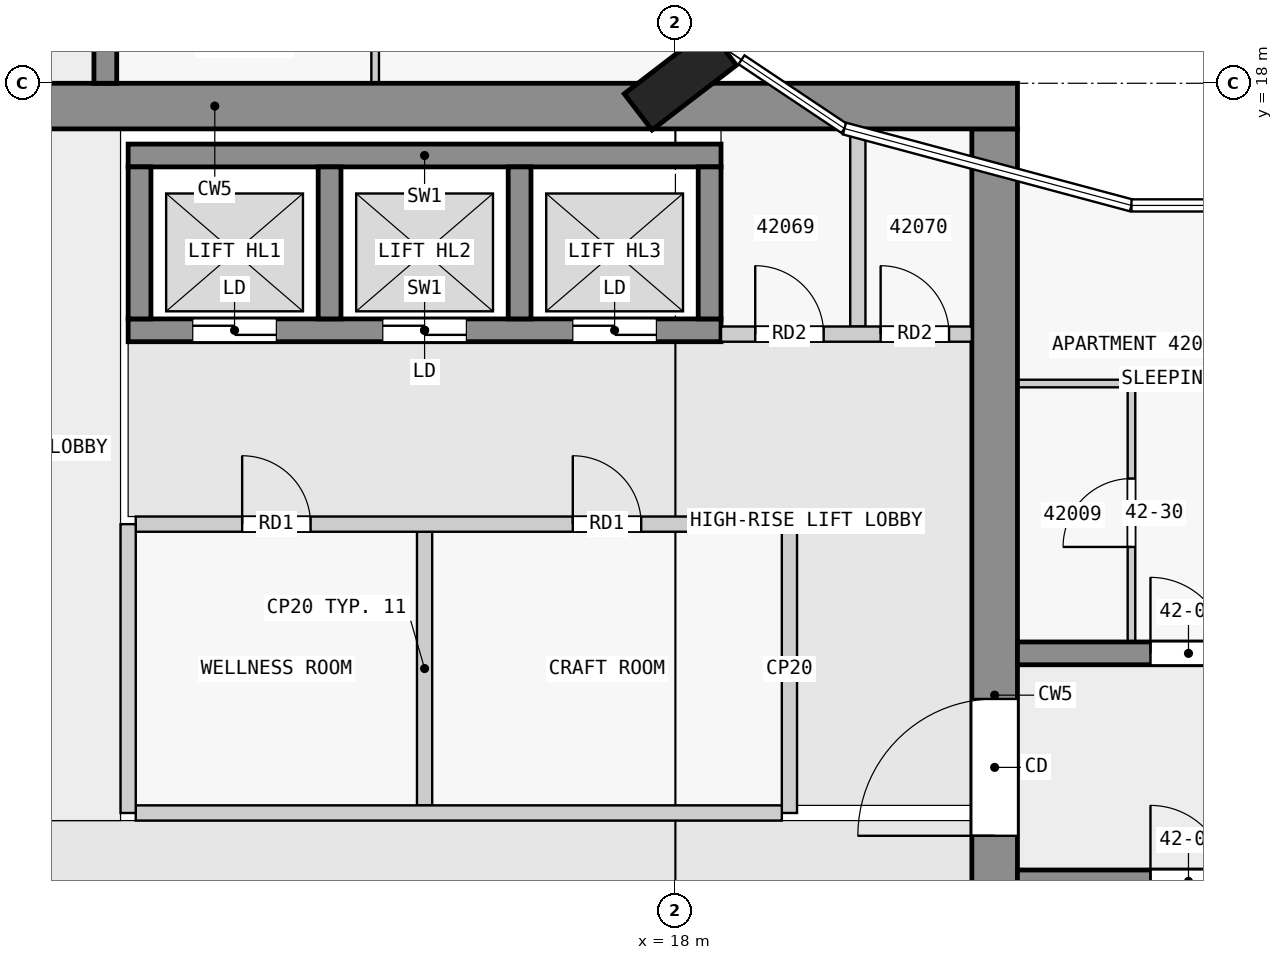
"""IFC4 building model, lengths in metres.
Left out: names, types, materials, properties, quantities, classifications, styles, units other than length and angle.
Written with IfcOpenShell. Run it as: python <this file> out.ifc"""

import sys

from ifc_helpers import new_model, si_unit, direction, frame, frame_2d, origin, origin_2d, place, context, subcontext, project, spatial, rectangle, extrude, element, fill, save


model = new_model("IFC4")
c1 = context("Model", 3, precision=1e-05, world=origin(), true_north=direction((0.0, 1.0)))
c2 = subcontext(c1, "Body", "Model", "MODEL_VIEW")
j1 = project(units=[si_unit("LENGTHUNIT", "METRE"), si_unit("PLANEANGLEUNIT", "RADIAN")], contexts=[c1])
p1 = place(None, origin())
s1 = spatial("IfcSite", under=j1, at=p1, CompositionType="ELEMENT")
p2 = place(p1, origin())
s2 = spatial("IfcBuilding", under=s1, at=p2, CompositionType="ELEMENT")
p3 = place(p2, frame((0.0, 0.0, 163.9)))
s3 = spatial("IfcBuildingStorey", under=s2, at=p3, CompositionType="ELEMENT", Elevation=163.9)
p4 = place(p3, frame((18.065, 18.05, 0.0), z_axis=(0.0, 0.0, 1.0), x_axis=(-0.608810846443, 0.793315418515, 0.0)))
e1 = element("IfcColumn", 1, at=p4, inside=s3, PredefinedType="COLUMN", context=c2, shape_type="SweptSolid", body=[
    extrude(rectangle(XDim=0.6, YDim=1.4, at=origin_2d()), origin(), (0.0, 0.0, 1.0), 3.5),
])
p5 = place(p3, frame((1.38, 17.7, 0.0), z_axis=(0.0, 0.0, 1.0), x_axis=(1.0, 0.0, 0.0)))
e2 = element("IfcWall", 2, at=p5, inside=s3, PredefinedType="SHEAR", context=c2, shape_type="SweptSolid", body=[
    extrude(rectangle(XDim=21.12, YDim=0.6, at=frame_2d((10.56, 0.0))), origin(), (0.0, 0.0, 1.0), 3.25),
])
p6 = place(p5, frame((6.4, 0.0, 0.0)))
e3 = element("IfcOpeningElement", 3, at=p6, cuts=e2, PredefinedType="OPENING", context=c2, shape_type="SweptSolid", body=[
    extrude(rectangle(XDim=1.8, YDim=2.1, at=frame_2d((0.9, 1.05))), frame((0.0, 0.31, 0.0), z_axis=(0.0, -1.0, 0.0), x_axis=(1.0, 0.0, 0.0)), (0.0, 0.0, 1.0), 0.62),
])
p7 = place(p3, frame((22.2, 2.5, 0.0), z_axis=(0.0, 0.0, 1.0), x_axis=(0.0, 1.0, 0.0)))
e4 = element("IfcWall", 4, at=p7, inside=s3, PredefinedType="SHEAR", context=c2, shape_type="SweptSolid", body=[
    extrude(rectangle(XDim=14.9, YDim=0.6, at=frame_2d((7.45, 0.0))), origin(), (0.0, 0.0, 1.0), 3.25),
])
p8 = place(p7, frame((5.6, 0.0, 0.0)))
e5 = element("IfcOpeningElement", 5, at=p8, cuts=e4, PredefinedType="OPENING", context=c2, shape_type="SweptSolid", body=[
    extrude(rectangle(XDim=1.8, YDim=2.1, at=frame_2d((0.9, 1.05))), frame((0.0, 0.31, 0.0), z_axis=(0.0, -1.0, 0.0), x_axis=(1.0, 0.0, 0.0)), (0.0, 0.0, 1.0), 0.62),
])
p9 = place(p3, frame((10.8, 17.05, 0.0), z_axis=(0.0, 0.0, 1.0), x_axis=(1.0, 0.0, 0.0)))
e6 = element("IfcWall", 6, at=p9, inside=s3, PredefinedType="SHEAR", context=c2, shape_type="SweptSolid", body=[
    extrude(rectangle(XDim=7.8, YDim=0.3, at=frame_2d((3.9, 0.0))), origin(), (0.0, 0.0, 1.0), 3.25),
])
p10 = place(p3, frame((10.8, 14.75, 0.0), z_axis=(0.0, 0.0, 1.0), x_axis=(1.0, 0.0, 0.0)))
e7 = element("IfcWall", 7, at=p10, inside=s3, PredefinedType="SHEAR", context=c2, shape_type="SweptSolid", body=[
    extrude(rectangle(XDim=7.8, YDim=0.3, at=frame_2d((3.9, 0.0))), origin(), (0.0, 0.0, 1.0), 3.25),
])
p11 = place(p10, frame((0.85, 0.0, 0.0)))
e8 = element("IfcOpeningElement", 8, at=p11, cuts=e7, PredefinedType="OPENING", context=c2, shape_type="SweptSolid", body=[
    extrude(rectangle(XDim=1.1, YDim=2.1, at=frame_2d((0.55, 1.05))), frame((0.0, 0.16, 0.0), z_axis=(0.0, -1.0, 0.0), x_axis=(1.0, 0.0, 0.0)), (0.0, 0.0, 1.0), 0.32),
])
p12 = place(p10, frame((3.35, 0.0, 0.0)))
e9 = element("IfcOpeningElement", 9, at=p12, cuts=e7, PredefinedType="OPENING", context=c2, shape_type="SweptSolid", body=[
    extrude(rectangle(XDim=1.1, YDim=2.1, at=frame_2d((0.55, 1.05))), frame((0.0, 0.16, 0.0), z_axis=(0.0, -1.0, 0.0), x_axis=(1.0, 0.0, 0.0)), (0.0, 0.0, 1.0), 0.32),
])
p13 = place(p10, frame((5.85, 0.0, 0.0)))
e10 = element("IfcOpeningElement", 10, at=p13, cuts=e7, PredefinedType="OPENING", context=c2, shape_type="SweptSolid", body=[
    extrude(rectangle(XDim=1.1, YDim=2.1, at=frame_2d((0.55, 1.05))), frame((0.0, 0.16, 0.0), z_axis=(0.0, -1.0, 0.0), x_axis=(1.0, 0.0, 0.0)), (0.0, 0.0, 1.0), 0.32),
])
for number, where, z_axis, x_axis in (
    (11, (10.95, 14.9, 0.0), (0.0, 0.0, 1.0), (0.0, 1.0, 0.0)),
    (12, (13.45, 14.9, 0.0), (0.0, 0.0, 1.0), (0.0, 1.0, 0.0)),
    (13, (15.95, 14.9, 0.0), (0.0, 0.0, 1.0), (0.0, 1.0, 0.0)),
    (14, (18.45, 14.9, 0.0), (0.0, 0.0, 1.0), (0.0, 1.0, 0.0)),
):
    element("IfcWall", number, at=place(p3, frame(where, z_axis=z_axis, x_axis=x_axis)), inside=s3, PredefinedType="SHEAR", context=c2, shape_type="SweptSolid", body=[
        extrude(rectangle(XDim=2.0, YDim=0.3, at=frame_2d((1.0, 0.0))), origin(), (0.0, 0.0, 1.0), 3.25),
    ])
p14 = place(p3, frame((22.5, 7.5, 0.0), z_axis=(0.0, 0.0, 1.0), x_axis=(1.0, 0.0, 0.0)))
e15 = element("IfcWall", 15, at=p14, inside=s3, PredefinedType="SHEAR", context=c2, shape_type="SweptSolid", body=[
    extrude(rectangle(XDim=22.5, YDim=0.3, at=frame_2d((11.25, 0.0))), origin(), (0.0, 0.0, 1.0), 3.25),
])
p15 = place(p14, frame((1.75, 0.0, 0.0)))
e16 = element("IfcOpeningElement", 16, at=p15, cuts=e15, PredefinedType="OPENING", context=c2, shape_type="SweptSolid", body=[
    extrude(rectangle(XDim=1.0, YDim=2.1, at=frame_2d((0.5, 1.05))), frame((0.0, 0.16, 0.0), z_axis=(0.0, -1.0, 0.0), x_axis=(1.0, 0.0, 0.0)), (0.0, 0.0, 1.0), 0.32),
])
p16 = place(p14, frame((6.25, 0.0, 0.0)))
e17 = element("IfcOpeningElement", 17, at=p16, cuts=e15, PredefinedType="OPENING", context=c2, shape_type="SweptSolid", body=[
    extrude(rectangle(XDim=1.0, YDim=2.1, at=frame_2d((0.5, 1.05))), frame((0.0, 0.16, 0.0), z_axis=(0.0, -1.0, 0.0), x_axis=(1.0, 0.0, 0.0)), (0.0, 0.0, 1.0), 0.32),
])
p17 = place(p14, frame((10.75, 0.0, 0.0)))
e18 = element("IfcOpeningElement", 18, at=p17, cuts=e15, PredefinedType="OPENING", context=c2, shape_type="SweptSolid", body=[
    extrude(rectangle(XDim=1.0, YDim=2.1, at=frame_2d((0.5, 1.05))), frame((0.0, 0.16, 0.0), z_axis=(0.0, -1.0, 0.0), x_axis=(1.0, 0.0, 0.0)), (0.0, 0.0, 1.0), 0.32),
])
p18 = place(p14, frame((15.25, 0.0, 0.0)))
e19 = element("IfcOpeningElement", 19, at=p18, cuts=e15, PredefinedType="OPENING", context=c2, shape_type="SweptSolid", body=[
    extrude(rectangle(XDim=1.0, YDim=2.1, at=frame_2d((0.5, 1.05))), frame((0.0, 0.16, 0.0), z_axis=(0.0, -1.0, 0.0), x_axis=(1.0, 0.0, 0.0)), (0.0, 0.0, 1.0), 0.32),
])
p19 = place(p14, frame((18.75, 0.0, 0.0)))
e20 = element("IfcOpeningElement", 20, at=p19, cuts=e15, PredefinedType="OPENING", context=c2, shape_type="SweptSolid", body=[
    extrude(rectangle(XDim=0.9, YDim=2.1, at=frame_2d((0.45, 1.05))), frame((0.0, 0.16, 0.0), z_axis=(0.0, -1.0, 0.0), x_axis=(1.0, 0.0, 0.0)), (0.0, 0.0, 1.0), 0.32),
])
p20 = place(p14, frame((20.95, 0.0, 0.0)))
e21 = element("IfcOpeningElement", 21, at=p20, cuts=e15, PredefinedType="OPENING", context=c2, shape_type="SweptSolid", body=[
    extrude(rectangle(XDim=1.0, YDim=2.1, at=frame_2d((0.5, 1.05))), frame((0.0, 0.16, 0.0), z_axis=(0.0, -1.0, 0.0), x_axis=(1.0, 0.0, 0.0)), (0.0, 0.0, 1.0), 0.32),
])
p21 = place(p3, frame((22.5, 10.5, 0.0), z_axis=(0.0, 0.0, 1.0), x_axis=(1.0, 0.0, 0.0)))
e22 = element("IfcWall", 22, at=p21, inside=s3, PredefinedType="SHEAR", context=c2, shape_type="SweptSolid", body=[
    extrude(rectangle(XDim=22.5, YDim=0.3, at=frame_2d((11.25, 0.0))), origin(), (0.0, 0.0, 1.0), 3.25),
])
p22 = place(p21, frame((1.75, 0.0, 0.0)))
e23 = element("IfcOpeningElement", 23, at=p22, cuts=e22, PredefinedType="OPENING", context=c2, shape_type="SweptSolid", body=[
    extrude(rectangle(XDim=1.0, YDim=2.1, at=frame_2d((0.5, 1.05))), frame((0.0, 0.16, 0.0), z_axis=(0.0, -1.0, 0.0), x_axis=(1.0, 0.0, 0.0)), (0.0, 0.0, 1.0), 0.32),
])
p23 = place(p21, frame((6.25, 0.0, 0.0)))
e24 = element("IfcOpeningElement", 24, at=p23, cuts=e22, PredefinedType="OPENING", context=c2, shape_type="SweptSolid", body=[
    extrude(rectangle(XDim=1.0, YDim=2.1, at=frame_2d((0.5, 1.05))), frame((0.0, 0.16, 0.0), z_axis=(0.0, -1.0, 0.0), x_axis=(1.0, 0.0, 0.0)), (0.0, 0.0, 1.0), 0.32),
])
p24 = place(p21, frame((10.35, 0.0, 0.0)))
e25 = element("IfcOpeningElement", 25, at=p24, cuts=e22, PredefinedType="OPENING", context=c2, shape_type="SweptSolid", body=[
    extrude(rectangle(XDim=1.8, YDim=2.1, at=frame_2d((0.9, 1.05))), frame((0.0, 0.16, 0.0), z_axis=(0.0, -1.0, 0.0), x_axis=(1.0, 0.0, 0.0)), (0.0, 0.0, 1.0), 0.32),
])
p25 = place(p21, frame((16.85, 0.0, 0.0)))
e26 = element("IfcOpeningElement", 26, at=p25, cuts=e22, PredefinedType="OPENING", context=c2, shape_type="SweptSolid", body=[
    extrude(rectangle(XDim=1.0, YDim=2.1, at=frame_2d((0.5, 1.05))), frame((0.0, 0.16, 0.0), z_axis=(0.0, -1.0, 0.0), x_axis=(1.0, 0.0, 0.0)), (0.0, 0.0, 1.0), 0.32),
])
p26 = place(p3, frame((10.5, 18.0, 0.0), z_axis=(0.0, 0.0, 1.0), x_axis=(0.0, 1.0, 0.0)))
e27 = element("IfcWall", 27, at=p26, inside=s3, PredefinedType="SHEAR", context=c2, shape_type="SweptSolid", body=[
    extrude(rectangle(XDim=27.0, YDim=0.3, at=frame_2d((13.5, 0.0))), origin(), (0.0, 0.0, 1.0), 3.25),
])
p27 = place(p26, frame((1.75, 0.0, 0.0)))
e28 = element("IfcOpeningElement", 28, at=p27, cuts=e27, PredefinedType="OPENING", context=c2, shape_type="SweptSolid", body=[
    extrude(rectangle(XDim=1.0, YDim=2.1, at=frame_2d((0.5, 1.05))), frame((0.0, 0.16, 0.0), z_axis=(0.0, -1.0, 0.0), x_axis=(1.0, 0.0, 0.0)), (0.0, 0.0, 1.0), 0.32),
])
p28 = place(p26, frame((6.25, 0.0, 0.0)))
e29 = element("IfcOpeningElement", 29, at=p28, cuts=e27, PredefinedType="OPENING", context=c2, shape_type="SweptSolid", body=[
    extrude(rectangle(XDim=1.0, YDim=2.1, at=frame_2d((0.5, 1.05))), frame((0.0, 0.16, 0.0), z_axis=(0.0, -1.0, 0.0), x_axis=(1.0, 0.0, 0.0)), (0.0, 0.0, 1.0), 0.32),
])
p29 = place(p26, frame((10.35, 0.0, 0.0)))
e30 = element("IfcOpeningElement", 30, at=p29, cuts=e27, PredefinedType="OPENING", context=c2, shape_type="SweptSolid", body=[
    extrude(rectangle(XDim=1.8, YDim=2.1, at=frame_2d((0.9, 1.05))), frame((0.0, 0.16, 0.0), z_axis=(0.0, -1.0, 0.0), x_axis=(1.0, 0.0, 0.0)), (0.0, 0.0, 1.0), 0.32),
])
p30 = place(p26, frame((17.55, 0.0, 0.0)))
e31 = element("IfcOpeningElement", 31, at=p30, cuts=e27, PredefinedType="OPENING", context=c2, shape_type="SweptSolid", body=[
    extrude(rectangle(XDim=1.0, YDim=2.1, at=frame_2d((0.5, 1.05))), frame((0.0, 0.16, 0.0), z_axis=(0.0, -1.0, 0.0), x_axis=(1.0, 0.0, 0.0)), (0.0, 0.0, 1.0), 0.32),
])
p31 = place(p26, frame((23.25, 0.0, 0.0)))
e32 = element("IfcOpeningElement", 32, at=p31, cuts=e27, PredefinedType="OPENING", context=c2, shape_type="SweptSolid", body=[
    extrude(rectangle(XDim=0.9, YDim=2.1, at=frame_2d((0.45, 1.05))), frame((0.0, 0.16, 0.0), z_axis=(0.0, -1.0, 0.0), x_axis=(1.0, 0.0, 0.0)), (0.0, 0.0, 1.0), 0.32),
])
p32 = place(p26, frame((25.45, 0.0, 0.0)))
e33 = element("IfcOpeningElement", 33, at=p32, cuts=e27, PredefinedType="OPENING", context=c2, shape_type="SweptSolid", body=[
    extrude(rectangle(XDim=1.0, YDim=2.1, at=frame_2d((0.5, 1.05))), frame((0.0, 0.16, 0.0), z_axis=(0.0, -1.0, 0.0), x_axis=(1.0, 0.0, 0.0)), (0.0, 0.0, 1.0), 0.32),
])
p33 = place(p3, frame((10.8, 8.4, 0.0), z_axis=(0.0, 0.0, 1.0), x_axis=(0.0, 1.0, 0.0)))
e34 = element("IfcWall", 34, at=p33, inside=s3, PredefinedType="PARTITIONING", context=c2, shape_type="SweptSolid", body=[
    extrude(rectangle(XDim=3.8, YDim=0.2, at=frame_2d((1.9, 0.0))), origin(), (0.0, 0.0, 1.0), 3.25),
])
p34 = place(p3, frame((10.9, 8.4, 0.0), z_axis=(0.0, 0.0, 1.0), x_axis=(1.0, 0.0, 0.0)))
e35 = element("IfcWall", 35, at=p34, inside=s3, PredefinedType="PARTITIONING", context=c2, shape_type="SweptSolid", body=[
    extrude(rectangle(XDim=8.5, YDim=0.2, at=frame_2d((4.25, 0.0))), origin(), (0.0, 0.0, 1.0), 3.25),
])
p35 = place(p3, frame((19.5, 8.4, 0.0), z_axis=(0.0, 0.0, 1.0), x_axis=(0.0, 1.0, 0.0)))
e36 = element("IfcWall", 36, at=p35, inside=s3, PredefinedType="PARTITIONING", context=c2, shape_type="SweptSolid", body=[
    extrude(rectangle(XDim=3.8, YDim=0.2, at=frame_2d((1.9, 0.0))), origin(), (0.0, 0.0, 1.0), 3.25),
])
p36 = place(p3, frame((10.9, 12.2, 0.0), z_axis=(0.0, 0.0, 1.0), x_axis=(1.0, 0.0, 0.0)))
e37 = element("IfcWall", 37, at=p36, inside=s3, PredefinedType="PARTITIONING", context=c2, shape_type="SweptSolid", body=[
    extrude(rectangle(XDim=8.5, YDim=0.2, at=frame_2d((4.25, 0.0))), origin(), (0.0, 0.0, 1.0), 3.25),
])
p37 = place(p36, frame((1.4, 0.0, 0.0)))
e38 = element("IfcOpeningElement", 38, at=p37, cuts=e37, PredefinedType="OPENING", context=c2, shape_type="SweptSolid", body=[
    extrude(rectangle(XDim=0.9, YDim=2.1, at=frame_2d((0.45, 1.05))), frame((0.0, 0.11, 0.0), z_axis=(0.0, -1.0, 0.0), x_axis=(1.0, 0.0, 0.0)), (0.0, 0.0, 1.0), 0.22),
])
p38 = place(p36, frame((5.75, 0.0, 0.0)))
e39 = element("IfcOpeningElement", 39, at=p38, cuts=e37, PredefinedType="OPENING", context=c2, shape_type="SweptSolid", body=[
    extrude(rectangle(XDim=0.9, YDim=2.1, at=frame_2d((0.45, 1.05))), frame((0.0, 0.11, 0.0), z_axis=(0.0, -1.0, 0.0), x_axis=(1.0, 0.0, 0.0)), (0.0, 0.0, 1.0), 0.22),
])
p39 = place(p3, frame((14.7, 8.5, 0.0), z_axis=(0.0, 0.0, 1.0), x_axis=(0.0, 1.0, 0.0)))
e40 = element("IfcWall", 40, at=p39, inside=s3, PredefinedType="PARTITIONING", context=c2, shape_type="SweptSolid", body=[
    extrude(rectangle(XDim=3.6, YDim=0.2, at=frame_2d((1.8, 0.0))), origin(), (0.0, 0.0, 1.0), 3.25),
])
p40 = place(p3, frame((18.6, 14.7, 0.0), z_axis=(0.0, 0.0, 1.0), x_axis=(1.0, 0.0, 0.0)))
e41 = element("IfcWall", 41, at=p40, inside=s3, PredefinedType="PARTITIONING", context=c2, shape_type="SweptSolid", body=[
    extrude(rectangle(XDim=3.3, YDim=0.2, at=frame_2d((1.65, 0.0))), origin(), (0.0, 0.0, 1.0), 3.25),
])
p41 = place(p40, frame((0.45, 0.0, 0.0)))
e42 = element("IfcOpeningElement", 42, at=p41, cuts=e41, PredefinedType="OPENING", context=c2, shape_type="SweptSolid", body=[
    extrude(rectangle(XDim=0.9, YDim=2.1, at=frame_2d((0.45, 1.05))), frame((0.0, 0.11, 0.0), z_axis=(0.0, -1.0, 0.0), x_axis=(1.0, 0.0, 0.0)), (0.0, 0.0, 1.0), 0.22),
])
p42 = place(p40, frame((2.1, 0.0, 0.0)))
e43 = element("IfcOpeningElement", 43, at=p42, cuts=e41, PredefinedType="OPENING", context=c2, shape_type="SweptSolid", body=[
    extrude(rectangle(XDim=0.9, YDim=2.1, at=frame_2d((0.45, 1.05))), frame((0.0, 0.11, 0.0), z_axis=(0.0, -1.0, 0.0), x_axis=(1.0, 0.0, 0.0)), (0.0, 0.0, 1.0), 0.22),
])
p43 = place(p3, frame((20.4, 14.8, 0.0), z_axis=(0.0, 0.0, 1.0), x_axis=(0.0, 1.0, 0.0)))
e44 = element("IfcWall", 44, at=p43, inside=s3, PredefinedType="PARTITIONING", context=c2, shape_type="SweptSolid", body=[
    extrude(rectangle(XDim=2.6, YDim=0.2, at=frame_2d((1.3, 0.0))), origin(), (0.0, 0.0, 1.0), 3.25),
])
for number, where, z_axis, x_axis in (
    (45, (23.95, 14.05, 0.0), (0.0, 0.0, 1.0), (-1.0, 0.0, 0.0)),
    (46, (14.05, 18.0, 0.0), (0.0, 0.0, 1.0), (0.0, 1.0, 0.0)),
):
    element("IfcWall", number, at=place(p3, frame(where, z_axis=z_axis, x_axis=x_axis)), inside=s3, PredefinedType="PARTITIONING", context=c2, shape_type="SweptSolid", body=[
        extrude(rectangle(XDim=1.45, YDim=0.1, at=frame_2d((0.725, 0.0))), origin(), (0.0, 0.0, 1.0), 3.25),
    ])
p44 = place(p3, frame((24.0, 10.65, 0.0), z_axis=(0.0, 0.0, 1.0), x_axis=(0.0, 1.0, 0.0)))
e47 = element("IfcWall", 47, at=p44, inside=s3, PredefinedType="PARTITIONING", context=c2, shape_type="SweptSolid", body=[
    extrude(rectangle(XDim=3.4, YDim=0.1, at=frame_2d((1.7, 0.0))), origin(), (0.0, 0.0, 1.0), 3.25),
])
p45 = place(p44, frame((1.25, 0.0, 0.0)))
e48 = element("IfcOpeningElement", 48, at=p45, cuts=e47, PredefinedType="OPENING", context=c2, shape_type="SweptSolid", body=[
    extrude(rectangle(XDim=0.9, YDim=2.1, at=frame_2d((0.45, 1.05))), frame((0.0, 0.06, 0.0), z_axis=(0.0, -1.0, 0.0), x_axis=(1.0, 0.0, 0.0)), (0.0, 0.0, 1.0), 0.12),
])
p46 = place(p37, origin())
e49 = element("IfcDoor", 49, at=p46, inside=s3, OperationType="SINGLE_SWING_LEFT", PredefinedType="DOOR", context=c2, shape_type="SweptSolid", body=[
    extrude(rectangle(XDim=0.9, YDim=2.1, at=frame_2d((0.45, 1.05))), frame((0.0, 0.025, 0.0), z_axis=(0.0, -1.0, 0.0), x_axis=(1.0, 0.0, 0.0)), (0.0, 0.0, 1.0), 0.05),
])
fill(e38, e49)
p47 = place(p38, origin())
e50 = element("IfcDoor", 50, at=p47, inside=s3, OperationType="SINGLE_SWING_LEFT", PredefinedType="DOOR", context=c2, shape_type="SweptSolid", body=[
    extrude(rectangle(XDim=0.9, YDim=2.1, at=frame_2d((0.45, 1.05))), frame((0.0, 0.025, 0.0), z_axis=(0.0, -1.0, 0.0), x_axis=(1.0, 0.0, 0.0)), (0.0, 0.0, 1.0), 0.05),
])
fill(e39, e50)
p48 = place(p11, origin())
e51 = element("IfcDoor", 51, at=p48, inside=s3, OperationType="DOUBLE_DOOR_SLIDING", PredefinedType="DOOR", context=c2, shape_type="SweptSolid", body=[
    extrude(rectangle(XDim=1.1, YDim=2.1, at=frame_2d((0.55, 1.05))), frame((0.0, 0.025, 0.0), z_axis=(0.0, -1.0, 0.0), x_axis=(1.0, 0.0, 0.0)), (0.0, 0.0, 1.0), 0.05),
])
fill(e8, e51)
p49 = place(p12, origin())
e52 = element("IfcDoor", 52, at=p49, inside=s3, OperationType="DOUBLE_DOOR_SLIDING", PredefinedType="DOOR", context=c2, shape_type="SweptSolid", body=[
    extrude(rectangle(XDim=1.1, YDim=2.1, at=frame_2d((0.55, 1.05))), frame((0.0, 0.025, 0.0), z_axis=(0.0, -1.0, 0.0), x_axis=(1.0, 0.0, 0.0)), (0.0, 0.0, 1.0), 0.05),
])
fill(e9, e52)
p50 = place(p13, origin())
e53 = element("IfcDoor", 53, at=p50, inside=s3, OperationType="DOUBLE_DOOR_SLIDING", PredefinedType="DOOR", context=c2, shape_type="SweptSolid", body=[
    extrude(rectangle(XDim=1.1, YDim=2.1, at=frame_2d((0.55, 1.05))), frame((0.0, 0.025, 0.0), z_axis=(0.0, -1.0, 0.0), x_axis=(1.0, 0.0, 0.0)), (0.0, 0.0, 1.0), 0.05),
])
fill(e10, e53)
p51 = place(p8, origin())
e54 = element("IfcDoor", 54, at=p51, inside=s3, OperationType="DOUBLE_DOOR_SINGLE_SWING", PredefinedType="DOOR", context=c2, shape_type="SweptSolid", body=[
    extrude(rectangle(XDim=1.8, YDim=2.1, at=frame_2d((0.9, 1.05))), frame((0.0, 0.025, 0.0), z_axis=(0.0, -1.0, 0.0), x_axis=(1.0, 0.0, 0.0)), (0.0, 0.0, 1.0), 0.05),
])
fill(e5, e54)
p52 = place(p41, origin())
e55 = element("IfcDoor", 55, at=p52, inside=s3, OperationType="SINGLE_SWING_LEFT", PredefinedType="DOOR", context=c2, shape_type="SweptSolid", body=[
    extrude(rectangle(XDim=0.9, YDim=2.1, at=frame_2d((0.45, 1.05))), frame((0.0, 0.025, 0.0), z_axis=(0.0, -1.0, 0.0), x_axis=(1.0, 0.0, 0.0)), (0.0, 0.0, 1.0), 0.05),
])
fill(e42, e55)
p53 = place(p42, origin())
e56 = element("IfcDoor", 56, at=p53, inside=s3, OperationType="SINGLE_SWING_LEFT", PredefinedType="DOOR", context=c2, shape_type="SweptSolid", body=[
    extrude(rectangle(XDim=0.9, YDim=2.1, at=frame_2d((0.45, 1.05))), frame((0.0, 0.025, 0.0), z_axis=(0.0, -1.0, 0.0), x_axis=(1.0, 0.0, 0.0)), (0.0, 0.0, 1.0), 0.05),
])
fill(e43, e56)
p54 = place(p15, origin())
e57 = element("IfcDoor", 57, at=p54, inside=s3, OperationType="SINGLE_SWING_LEFT", PredefinedType="DOOR", context=c2, shape_type="SweptSolid", body=[
    extrude(rectangle(XDim=1.0, YDim=2.1, at=frame_2d((0.5, 1.05))), frame((0.0, 0.025, 0.0), z_axis=(0.0, -1.0, 0.0), x_axis=(1.0, 0.0, 0.0)), (0.0, 0.0, 1.0), 0.05),
])
fill(e16, e57)
p55 = place(p22, origin())
e58 = element("IfcDoor", 58, at=p55, inside=s3, OperationType="SINGLE_SWING_LEFT", PredefinedType="DOOR", context=c2, shape_type="SweptSolid", body=[
    extrude(rectangle(XDim=1.0, YDim=2.1, at=frame_2d((0.5, 1.05))), frame((0.0, 0.025, 0.0), z_axis=(0.0, -1.0, 0.0), x_axis=(1.0, 0.0, 0.0)), (0.0, 0.0, 1.0), 0.05),
])
fill(e23, e58)
p56 = place(p45, origin())
e59 = element("IfcDoor", 59, at=p56, inside=s3, OperationType="SINGLE_SWING_LEFT", PredefinedType="DOOR", context=c2, shape_type="SweptSolid", body=[
    extrude(rectangle(XDim=0.9, YDim=2.1, at=frame_2d((0.45, 1.05))), frame((0.0, 0.025, 0.0), z_axis=(0.0, -1.0, 0.0), x_axis=(1.0, 0.0, 0.0)), (0.0, 0.0, 1.0), 0.05),
])
fill(e48, e59)
save(model, sys.argv[1])
